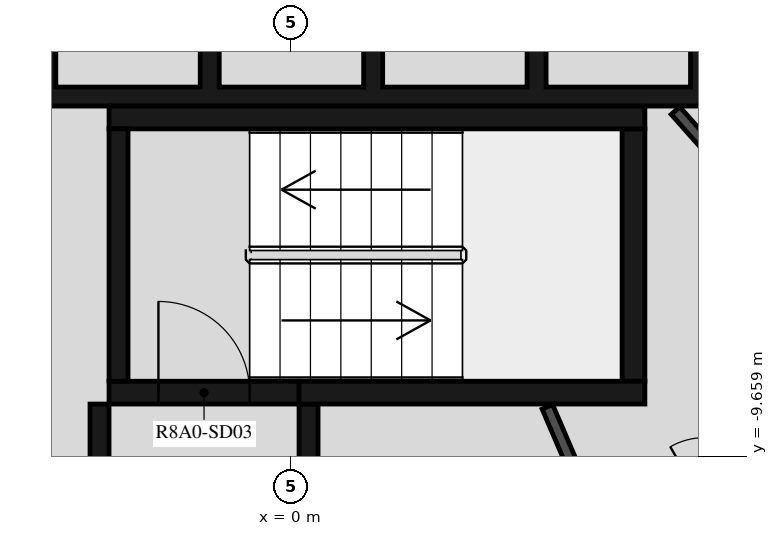
"""IFC4 building model, lengths in metres.
Left out: names, types, materials, properties, quantities, classifications, styles, units other than length and angle.
Written with IfcOpenShell. Run it as: python <this file> out.ifc"""

import sys

from ifc_helpers import new_model, si_unit, direction, frame, frame_2d, origin, place, context, subcontext, project, spatial, polyline, rectangle, outline, extrude, element, fill, save


model = new_model("IFC4")
c1 = context("Model", 3, precision=1e-05, world=origin(), true_north=direction((0.0, 1.0)))
c2 = subcontext(c1, "Body", "Model", "MODEL_VIEW")
j1 = project(units=[si_unit("LENGTHUNIT", "METRE"), si_unit("PLANEANGLEUNIT", "RADIAN")], contexts=[c1])
p1 = place(None, origin())
s1 = spatial("IfcSite", under=j1, at=p1, CompositionType="ELEMENT")
p2 = place(p1, origin())
s2 = spatial("IfcBuilding", under=s1, at=p2, CompositionType="ELEMENT")
p3 = place(p2, frame((0.0, 0.0, 298.2)))
s3 = spatial("IfcBuildingStorey", under=s2, at=p3, CompositionType="ELEMENT", Elevation=298.2)
p4 = place(p3, frame((4.51, -10.845, 0.0), z_axis=(0.0, 0.0, 1.0), x_axis=(0.865975092491, 0.500087131594, 0.0)))
e1 = element("IfcWall", 1, at=p4, inside=s3, PredefinedType="SHEAR", context=c2, shape_type="SweptSolid", body=[
    extrude(rectangle(XDim=3.033, YDim=0.5, at=frame_2d((1.516, 0.0))), origin(), (0.0, 0.0, 1.0), 3.12),
])
p5 = place(p4, frame((1.066, 0.0, 0.0)))
e2 = element("IfcOpeningElement", 2, at=p5, cuts=e1, PredefinedType="OPENING", context=c2, shape_type="SweptSolid", body=[
    extrude(rectangle(XDim=0.9, YDim=2.1, at=frame_2d((0.45, 1.05))), frame((0.0, 0.26, 0.0), z_axis=(0.0, -1.0, 0.0), x_axis=(1.0, 0.0, 0.0)), (0.0, 0.0, 1.0), 0.52),
])
p6 = place(p3, frame((-2.275, -8.67, 0.0), z_axis=(0.0, 0.0, 1.0), x_axis=(0.0, 1.0, 0.0)))
e3 = element("IfcWall", 3, at=p6, inside=s3, PredefinedType="SHEAR", context=c2, shape_type="SweptSolid", body=[
    extrude(rectangle(XDim=3.32, YDim=0.25, at=frame_2d((1.66, 0.0))), origin(), (0.0, 0.0, 1.0), 3.12),
])
p7 = place(p3, frame((-2.4, -5.2, 0.0), z_axis=(0.0, 0.0, 1.0), x_axis=(1.0, 0.0, 0.0)))
e4 = element("IfcWall", 4, at=p7, inside=s3, PredefinedType="SHEAR", context=c2, shape_type="SweptSolid", body=[
    extrude(rectangle(XDim=7.05, YDim=0.3, at=frame_2d((3.525, 0.0))), origin(), (0.0, 0.0, 1.0), 3.12),
])
p8 = place(p3, frame((4.5, -8.67, 0.0), z_axis=(0.0, 0.0, 1.0), x_axis=(0.0, 1.0, 0.0)))
e5 = element("IfcWall", 5, at=p8, inside=s3, PredefinedType="SHEAR", context=c2, shape_type="SweptSolid", body=[
    extrude(rectangle(XDim=3.32, YDim=0.3, at=frame_2d((1.66, 0.0))), origin(), (0.0, 0.0, 1.0), 3.12),
])
p9 = place(p3, frame((0.1, -8.82, 0.0), z_axis=(0.0, 0.0, 1.0), x_axis=(1.0, 0.0, 0.0)))
e6 = element("IfcWall", 6, at=p9, inside=s3, PredefinedType="SHEAR", context=c2, shape_type="SweptSolid", body=[
    extrude(rectangle(XDim=4.55, YDim=0.3, at=frame_2d((2.275, 0.0))), origin(), (0.0, 0.0, 1.0), 3.12),
])
p10 = place(p3, frame((-2.4, -8.82, 0.0), z_axis=(0.0, 0.0, 1.0), x_axis=(1.0, 0.0, 0.0)))
e7 = element("IfcWall", 7, at=p10, inside=s3, PredefinedType="SHEAR", context=c2, shape_type="SweptSolid", body=[
    extrude(rectangle(XDim=2.5, YDim=0.3, at=frame_2d((1.25, 0.0))), origin(), (0.0, 0.0, 1.0), 3.12),
])
p11 = place(p10, frame((0.65, 0.0, 0.0)))
e8 = element("IfcOpeningElement", 8, at=p11, cuts=e7, PredefinedType="OPENING", context=c2, shape_type="SweptSolid", body=[
    extrude(rectangle(XDim=1.2, YDim=2.1, at=frame_2d((0.6, 1.05))), frame((0.0, 0.16, 0.0), z_axis=(0.0, -1.0, 0.0), x_axis=(1.0, 0.0, 0.0)), (0.0, 0.0, 1.0), 0.32),
])
p12 = place(p3, frame((-2.525, -8.97, 0.0), z_axis=(0.0, 0.0, 1.0), x_axis=(0.0, -1.0, 0.0)))
e9 = element("IfcWall", 9, at=p12, inside=s3, PredefinedType="SHEAR", context=c2, shape_type="SweptSolid", body=[
    extrude(rectangle(XDim=2.11, YDim=0.25, at=frame_2d((1.055, 0.0))), origin(), (0.0, 0.0, 1.0), 3.12),
])
p13 = place(p3, frame((0.225, -8.97, 0.0), z_axis=(0.0, 0.0, 1.0), x_axis=(0.0, -1.0, 0.0)))
e10 = element("IfcWall", 10, at=p13, inside=s3, PredefinedType="SHEAR", context=c2, shape_type="SweptSolid", body=[
    extrude(rectangle(XDim=2.41, YDim=0.25, at=frame_2d((1.205, 0.0))), origin(), (0.0, 0.0, 1.0), 3.12),
])
p14 = place(p3, origin())
e11 = element("IfcWall", 11, at=p14, inside=s3, PredefinedType="SHEAR", context=c2, shape_type="SweptSolid", body=[
    extrude(outline(polyline([(9.8, -5.05), (9.8, -4.8), (9.8, -1.9), (9.55, -1.9), (9.55, -4.8), (7.65, -4.8), (7.65, -1.9), (7.4, -1.9), (7.4, -4.8), (5.5, -4.8), (5.5, -1.9), (5.25, -1.9), (5.25, -4.8), (3.35, -4.8), (3.35, -1.9), (3.1, -1.9), (3.1, -4.8), (1.2, -4.8), (1.2, -1.9), (0.95, -1.9), (0.95, -4.8), (-0.95, -4.8), (-0.95, -1.9), (-1.2, -1.9), (-1.2, -4.8), (-3.1, -4.8), (-3.1, -1.9), (-3.35, -1.9), (-3.35, -4.8), (-5.25, -4.8), (-5.25, -1.9), (-5.5, -1.9), (-5.5, -4.8), (-9.55, -4.8), (-9.55, -1.9), (-9.8, -1.9), (-9.8, -4.8), (-9.8, -5.05), (9.8, -5.05)])), origin(), (0.0, 0.0, 1.0), 3.12),
])
p15 = place(p3, frame((7.842, -8.248, 0.0), z_axis=(0.0, 0.0, 1.0), x_axis=(-0.66446128181, 0.747322691329, 0.0)))
e12 = element("IfcWall", 12, at=p15, inside=s3, PredefinedType="PARTITIONING", context=c2, shape_type="SweptSolid", body=[
    extrude(rectangle(XDim=4.198, YDim=0.15, at=frame_2d((2.099, 0.0))), origin(), (0.0, 0.0, 1.0), 3.12),
])
p16 = place(p3, frame((3.367, -9.007, 0.0), z_axis=(0.0, 0.0, 1.0), x_axis=(0.394387482265, -0.918944238696, 0.0)))
e13 = element("IfcWall", 13, at=p16, inside=s3, PredefinedType="PARTITIONING", context=c2, shape_type="SweptSolid", body=[
    extrude(rectangle(XDim=1.825, YDim=0.15, at=frame_2d((0.913, 0.0))), origin(), (0.0, 0.0, 1.0), 3.12),
])
p17 = place(p11, origin())
e14 = element("IfcDoor", 14, at=p17, inside=s3, OperationType="SINGLE_SWING_LEFT", PredefinedType="DOOR", context=c2, shape_type="SweptSolid", body=[
    extrude(rectangle(XDim=1.2, YDim=2.1, at=frame_2d((0.6, 1.05))), frame((0.0, 0.025, 0.0), z_axis=(0.0, -1.0, 0.0), x_axis=(1.0, 0.0, 0.0)), (0.0, 0.0, 1.0), 0.05),
])
fill(e8, e14)
save(model, sys.argv[1])
